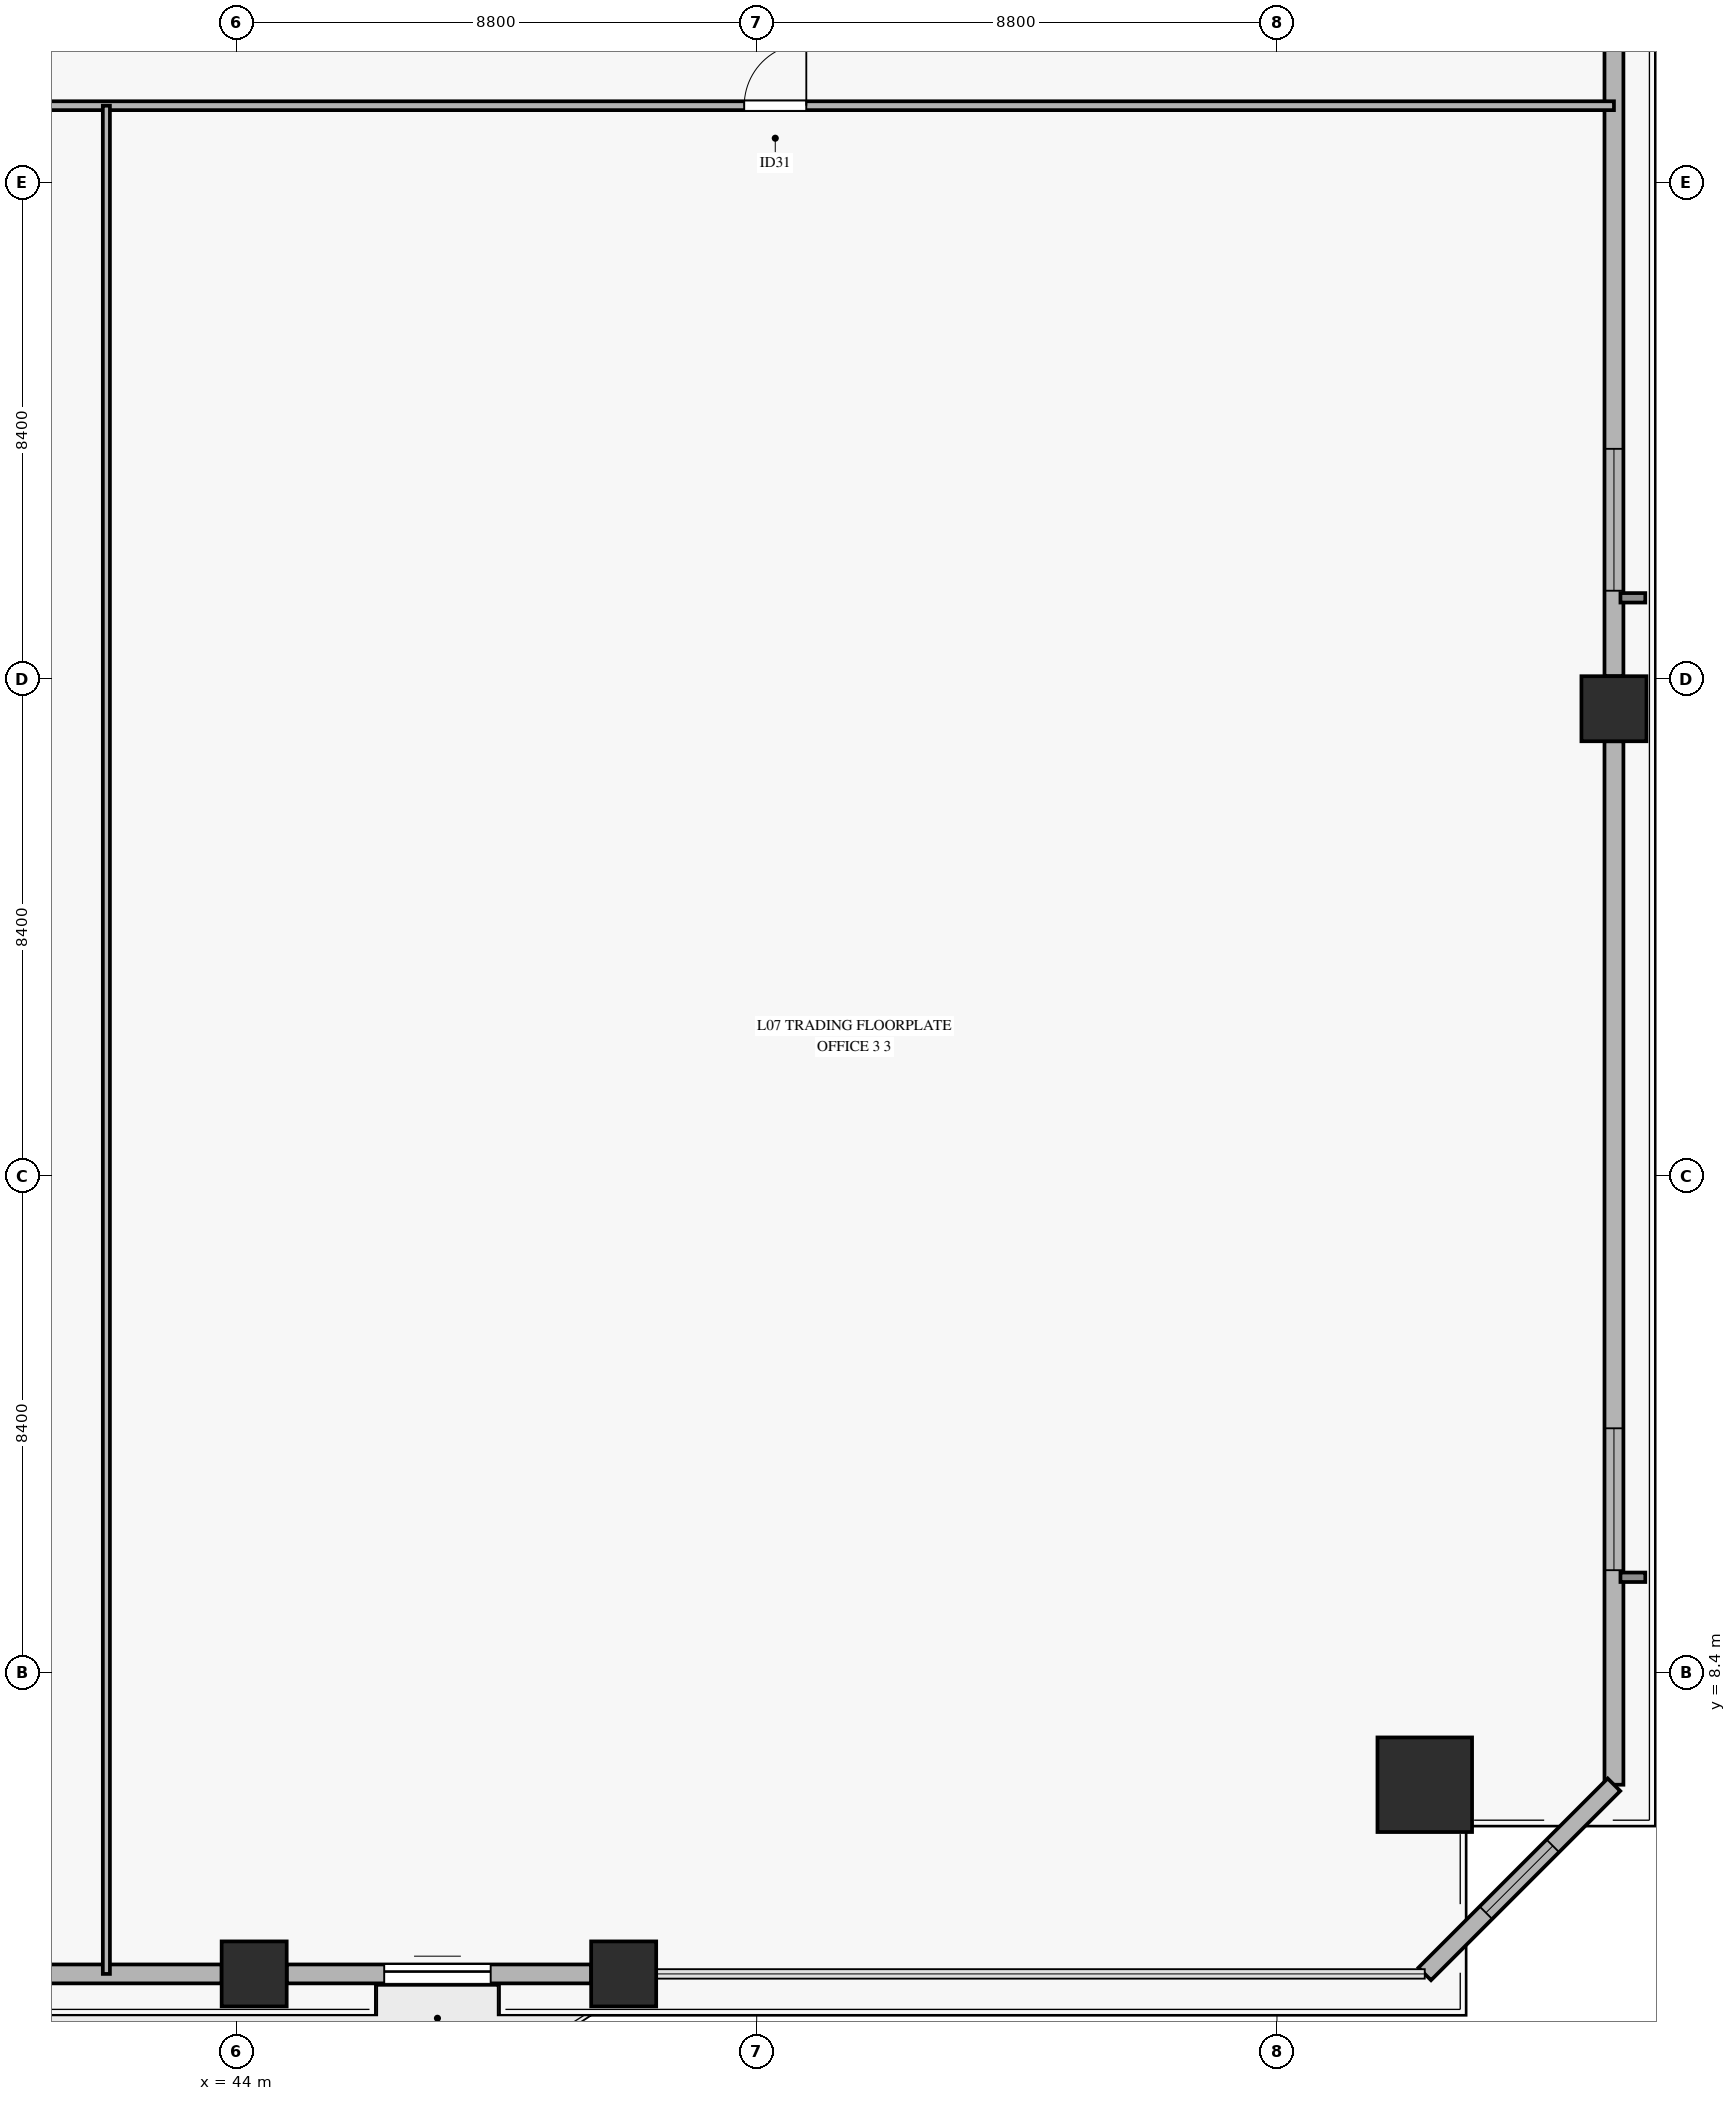
"""IFC4 building model, lengths in metres.
Left out: names, types, materials, properties, quantities, classifications, styles, units other than length and angle.
Written with IfcOpenShell. Run it as: python <this file> out.ifc"""

import sys

from ifc_helpers import new_model, si_unit, direction, frame, frame_2d, origin, origin_2d, place, context, subcontext, project, spatial, rectangle, hollow_rectangle, extrude, source, transform, mapped, element, fill, save


model = new_model("IFC4")
c1 = context("Model", 3, precision=1e-05, world=origin(), true_north=direction((0.0, 1.0)))
c2 = subcontext(c1, "Body", "Model", "MODEL_VIEW")
j1 = project(units=[si_unit("LENGTHUNIT", "METRE"), si_unit("PLANEANGLEUNIT", "RADIAN")], contexts=[c1])
p1 = place(None, origin())
s1 = spatial("IfcSite", under=j1, at=p1, CompositionType="ELEMENT")
p2 = place(p1, origin())
s2 = spatial("IfcBuilding", under=s1, at=p2, CompositionType="ELEMENT")
p3 = place(p2, frame((0.0, 0.0, 29.3)))
s3 = spatial("IfcBuildingStorey", under=s2, at=p3, CompositionType="ELEMENT", Elevation=29.3)
m1 = source(origin(), c2, "Body", "SweptSolid", [
    extrude(hollow_rectangle(XDim=1.6, YDim=1.6, WallThickness=0.075, at=origin_2d()), origin(), (0.0, 0.0, 1.0), 3.68),
])
p4 = place(p3, frame((64.1, 6.5, 0.0), z_axis=(0.0, 0.0, 1.0), x_axis=(1.0, 0.0, 0.0)))
e1 = element("IfcColumn", 1, at=p4, inside=s3, PredefinedType="COLUMN", context=c2, shape_type="MappedRepresentation", body=[
    mapped(m1, transform((0.0, 0.0, 0.0), x_axis=(1.0, 0.0, 0.0), y_axis=(0.0, 1.0, 0.0), z_axis=(0.0, 0.0, 1.0), scale=1.0)),
])
m2 = source(origin(), c2, "Body", "SweptSolid", [
    extrude(hollow_rectangle(XDim=1.1, YDim=1.1, WallThickness=0.05, at=origin_2d()), origin(), (0.0, 0.0, 1.0), 3.68),
])
for number, where, z_axis, x_axis in (
    (2, (44.3, 3.3, 0.0), (0.0, 0.0, 1.0), (1.0, 0.0, 0.0)),
    (3, (50.55, 3.3, 0.0), (0.0, 0.0, 1.0), (1.0, 0.0, 0.0)),
    (4, (67.3, 24.7, 0.0), (0.0, 0.0, 1.0), (1.0, 0.0, 0.0)),
):
    element("IfcColumn", number, at=place(p3, frame(where, z_axis=z_axis, x_axis=x_axis)), inside=s3, PredefinedType="COLUMN", context=c2, shape_type="MappedRepresentation", body=[
        mapped(m2, transform((0.0, 0.0, 0.0), x_axis=(1.0, 0.0, 0.0), y_axis=(0.0, 1.0, 0.0), z_axis=(0.0, 0.0, 1.0), scale=1.0)),
    ])
p5 = place(p3, frame((38.1, 3.3, 0.0), z_axis=(0.0, 0.0, 1.0), x_axis=(1.0, 0.0, 0.0)))
e5 = element("IfcWall", 5, at=p5, inside=s3, PredefinedType="SOLIDWALL", context=c2, shape_type="SweptSolid", body=[
    extrude(rectangle(XDim=5.65, YDim=0.32, at=frame_2d((2.825, 0.0))), origin(), (0.0, 0.0, 1.0), 3.16),
])
p6 = place(p3, frame((44.85, 3.3, 0.0), z_axis=(0.0, 0.0, 1.0), x_axis=(1.0, 0.0, 0.0)))
e6 = element("IfcWall", 6, at=p6, inside=s3, PredefinedType="SOLIDWALL", context=c2, shape_type="SweptSolid", body=[
    extrude(rectangle(XDim=5.15, YDim=0.32, at=frame_2d((2.575, 0.0))), origin(), (0.0, 0.0, 1.0), 3.16),
])
p7 = place(p6, frame((1.65, 0.0, 0.0)))
e7 = element("IfcOpeningElement", 7, at=p7, cuts=e6, PredefinedType="OPENING", context=c2, shape_type="SweptSolid", body=[
    extrude(rectangle(XDim=1.8, YDim=2.25, at=frame_2d((0.9, 1.125))), frame((0.0, 0.17, 0.0), z_axis=(0.0, -1.0, 0.0), x_axis=(1.0, 0.0, 0.0)), (0.0, 0.0, 1.0), 0.34),
])
p8 = place(p3, frame((67.3, 6.5, 0.0), z_axis=(0.0, 0.0, 1.0), x_axis=(0.0, 1.0, 0.0)))
e8 = element("IfcWall", 8, at=p8, inside=s3, PredefinedType="SOLIDWALL", context=c2, shape_type="SweptSolid", body=[
    extrude(rectangle(XDim=17.65, YDim=0.32, at=frame_2d((8.825, 0.0))), origin(), (0.0, 0.0, 1.0), 3.16),
])
p9 = place(p8, frame((3.629, 0.0, 0.45)))
e9 = element("IfcOpeningElement", 9, at=p9, cuts=e8, PredefinedType="OPENING", context=c2, shape_type="SweptSolid", body=[
    extrude(rectangle(XDim=2.4, YDim=2.1, at=frame_2d((1.2, 1.05))), frame((0.0, 0.17, 0.0), z_axis=(0.0, -1.0, 0.0), x_axis=(1.0, 0.0, 0.0)), (0.0, 0.0, 1.0), 0.34),
])
p10 = place(p3, frame((67.3, 25.25, 0.0), z_axis=(0.0, 0.0, 1.0), x_axis=(0.0, 1.0, 0.0)))
e10 = element("IfcWall", 10, at=p10, inside=s3, PredefinedType="SOLIDWALL", context=c2, shape_type="SweptSolid", body=[
    extrude(rectangle(XDim=17.65, YDim=0.32, at=frame_2d((8.825, 0.0))), origin(), (0.0, 0.0, 1.0), 3.16),
])
p11 = place(p10, frame((1.446, 0.0, 0.45)))
e11 = element("IfcOpeningElement", 11, at=p11, cuts=e10, PredefinedType="OPENING", context=c2, shape_type="SweptSolid", body=[
    extrude(rectangle(XDim=2.4, YDim=2.1, at=frame_2d((1.2, 1.05))), frame((0.0, 0.17, 0.0), z_axis=(0.0, -1.0, 0.0), x_axis=(1.0, 0.0, 0.0)), (0.0, 0.0, 1.0), 0.34),
])
p12 = place(p10, frame((13.66, 0.0, 0.45)))
e12 = element("IfcOpeningElement", 12, at=p12, cuts=e10, PredefinedType="OPENING", context=c2, shape_type="SweptSolid", body=[
    extrude(rectangle(XDim=2.4, YDim=2.1, at=frame_2d((1.2, 1.05))), frame((0.0, 0.17, 0.0), z_axis=(0.0, -1.0, 0.0), x_axis=(1.0, 0.0, 0.0)), (0.0, 0.0, 1.0), 0.34),
])
p13 = place(p3, frame((64.1, 3.3, 0.0), z_axis=(0.0, 0.0, 1.0), x_axis=(0.707106781187, 0.707106781187, 0.0)))
e13 = element("IfcWall", 13, at=p13, inside=s3, PredefinedType="SOLIDWALL", context=c2, shape_type="SweptSolid", body=[
    extrude(rectangle(XDim=4.525, YDim=0.3, at=frame_2d((2.263, 0.0))), origin(), (0.0, 0.0, 1.0), 3.16),
])
p14 = place(p13, frame((1.463, 0.0, 0.45)))
e14 = element("IfcOpeningElement", 14, at=p14, cuts=e13, PredefinedType="OPENING", context=c2, shape_type="SweptSolid", body=[
    extrude(rectangle(XDim=1.6, YDim=2.0, at=frame_2d((0.8, 1.0))), frame((0.0, 0.16, 0.0), z_axis=(0.0, -1.0, 0.0), x_axis=(1.0, 0.0, 0.0)), (0.0, 0.0, 1.0), 0.32),
])
p15 = place(p3, frame((3.1, 34.9, 0.0), z_axis=(0.0, 0.0, 1.0), x_axis=(1.0, 0.0, 0.0)))
e15 = element("IfcWall", 15, at=p15, inside=s3, PredefinedType="PARTITIONING", context=c2, shape_type="SweptSolid", body=[
    extrude(rectangle(XDim=64.2, YDim=0.15, at=frame_2d((32.1, 0.0))), origin(), (0.0, 0.0, 1.0), 2.765),
])
p16 = place(p15, frame((11.409, 0.0, 0.0)))
e16 = element("IfcOpeningElement", 16, at=p16, cuts=e15, PredefinedType="OPENING", context=c2, shape_type="SweptSolid", body=[
    extrude(rectangle(XDim=1.05, YDim=2.15, at=frame_2d((0.525, 1.075))), frame((0.0, 0.085, 0.0), z_axis=(0.0, -1.0, 0.0), x_axis=(1.0, 0.0, 0.0)), (0.0, 0.0, 1.0), 0.17),
])
p17 = place(p15, frame((31.787, 0.0, 0.0)))
e17 = element("IfcOpeningElement", 17, at=p17, cuts=e15, PredefinedType="OPENING", context=c2, shape_type="SweptSolid", body=[
    extrude(rectangle(XDim=1.05, YDim=2.15, at=frame_2d((0.525, 1.075))), frame((0.0, 0.085, 0.0), z_axis=(0.0, -1.0, 0.0), x_axis=(1.0, 0.0, 0.0)), (0.0, 0.0, 1.0), 0.17),
])
p18 = place(p15, frame((49.489, 0.0, 0.0)))
e18 = element("IfcOpeningElement", 18, at=p18, cuts=e15, PredefinedType="OPENING", context=c2, shape_type="SweptSolid", body=[
    extrude(rectangle(XDim=1.05, YDim=2.15, at=frame_2d((0.525, 1.075))), frame((0.0, 0.085, 0.0), z_axis=(0.0, -1.0, 0.0), x_axis=(1.0, 0.0, 0.0)), (0.0, 0.0, 1.0), 0.17),
])
p19 = place(p3, frame((41.8, 3.3, 0.0), z_axis=(0.0, 0.0, 1.0), x_axis=(0.0, 1.0, 0.0)))
e19 = element("IfcWall", 19, at=p19, inside=s3, PredefinedType="PARTITIONING", context=c2, shape_type="SweptSolid", body=[
    extrude(rectangle(XDim=31.6, YDim=0.12, at=frame_2d((15.8, 0.0))), origin(), (0.0, 0.0, 1.0), 3.165),
])
m3 = source(origin(), c2, "Body", "SweptSolid", [
    extrude(rectangle(XDim=1.8, YDim=2.25, at=frame_2d((0.9, 1.125))), frame((0.0, 0.025, 0.0), z_axis=(0.0, -1.0, 0.0), x_axis=(1.0, 0.0, 0.0)), (0.0, 0.0, 1.0), 0.05),
])
p20 = place(p7, origin())
e20 = element("IfcDoor", 20, at=p20, inside=s3, OperationType="SLIDING_TO_LEFT", PredefinedType="DOOR", context=c2, shape_type="MappedRepresentation", body=[
    mapped(m3, transform((0.0, 0.0, 0.0), x_axis=(1.0, 0.0, 0.0), y_axis=(0.0, 1.0, 0.0), z_axis=(0.0, 0.0, 1.0), scale=1.0)),
])
fill(e7, e20)
m4 = source(origin(), c2, "Body", "SweptSolid", [
    extrude(rectangle(XDim=2.4, YDim=2.1, at=frame_2d((1.2, 1.05))), frame((0.0, 0.03, 0.0), z_axis=(0.0, -1.0, 0.0), x_axis=(1.0, 0.0, 0.0)), (0.0, 0.0, 1.0), 0.06),
])
p21 = place(p9, origin())
e21 = element("IfcWindow", 21, at=p21, inside=s3, PartitioningType="SINGLE_PANEL", PredefinedType="WINDOW", context=c2, shape_type="MappedRepresentation", body=[
    mapped(m4, transform((0.0, 0.0, 0.0), x_axis=(1.0, 0.0, 0.0), y_axis=(0.0, 1.0, 0.0), z_axis=(0.0, 0.0, 1.0), scale=1.0)),
])
fill(e9, e21)
p22 = place(p11, origin())
e22 = element("IfcWindow", 22, at=p22, inside=s3, PartitioningType="SINGLE_PANEL", PredefinedType="WINDOW", context=c2, shape_type="MappedRepresentation", body=[
    mapped(m4, transform((0.0, 0.0, 0.0), x_axis=(1.0, 0.0, 0.0), y_axis=(0.0, 1.0, 0.0), z_axis=(0.0, 0.0, 1.0), scale=1.0)),
])
fill(e11, e22)
m5 = source(origin(), c2, "Body", "SweptSolid", [
    extrude(rectangle(XDim=1.6, YDim=2.0, at=frame_2d((0.8, 1.0))), frame((0.0, 0.03, 0.0), z_axis=(0.0, -1.0, 0.0), x_axis=(1.0, 0.0, 0.0)), (0.0, 0.0, 1.0), 0.06),
])
p23 = place(p14, origin())
e23 = element("IfcWindow", 23, at=p23, inside=s3, PartitioningType="SINGLE_PANEL", PredefinedType="WINDOW", context=c2, shape_type="MappedRepresentation", body=[
    mapped(m5, transform((0.0, 0.0, 0.0), x_axis=(1.0, 0.0, 0.0), y_axis=(0.0, 1.0, 0.0), z_axis=(0.0, 0.0, 1.0), scale=1.0)),
])
fill(e14, e23)
m6 = source(origin(), c2, "Body", "SweptSolid", [
    extrude(rectangle(XDim=1.05, YDim=2.15, at=frame_2d((0.525, 1.075))), frame((0.0, 0.025, 0.0), z_axis=(0.0, -1.0, 0.0), x_axis=(1.0, 0.0, 0.0)), (0.0, 0.0, 1.0), 0.05),
])
p24 = place(p18, origin())
e24 = element("IfcDoor", 24, at=p24, inside=s3, OperationType="SINGLE_SWING_RIGHT", PredefinedType="DOOR", context=c2, shape_type="MappedRepresentation", body=[
    mapped(m6, transform((0.0, 0.0, 0.0), x_axis=(1.0, 0.0, 0.0), y_axis=(0.0, 1.0, 0.0), z_axis=(0.0, 0.0, 1.0), scale=1.0)),
])
fill(e18, e24)
save(model, sys.argv[1])
